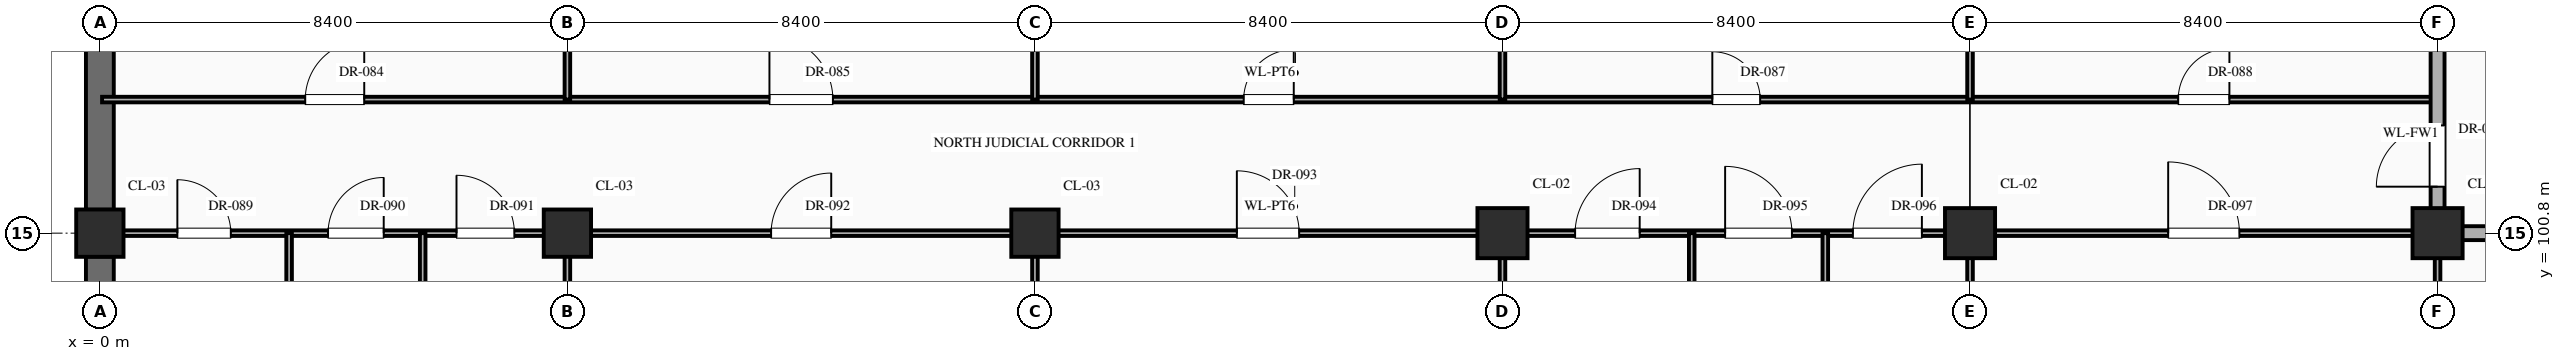
"""IFC4 building model, lengths in metres.
Left out: names, types, materials, properties, quantities, classifications, styles, units other than length and angle.
Written with IfcOpenShell. Run it as: python <this file> out.ifc"""

import sys

from ifc_helpers import new_model, si_unit, direction, frame, frame_2d, origin, origin_2d, place, context, subcontext, project, spatial, rectangle, extrude, element, fill, save


model = new_model("IFC4")
c1 = context("Model", 3, precision=1e-05, world=origin(), true_north=direction((0.0, 1.0)))
c2 = subcontext(c1, "Body", "Model", "MODEL_VIEW")
j1 = project(units=[si_unit("LENGTHUNIT", "METRE"), si_unit("PLANEANGLEUNIT", "RADIAN")], contexts=[c1])
p1 = place(None, origin())
s1 = spatial("IfcSite", under=j1, at=p1, CompositionType="ELEMENT")
p2 = place(p1, origin())
s2 = spatial("IfcBuilding", under=s1, at=p2, CompositionType="ELEMENT")
p3 = place(p2, frame((0.0, 0.0, -10.2)))
s3 = spatial("IfcBuildingStorey", under=s2, at=p3, CompositionType="ELEMENT", Elevation=-10.2)
for number, where, z_axis, x_axis in (
    (1, (0.0, 100.8, 0.0), (0.0, 0.0, 1.0), (1.0, 0.0, 0.0)),
    (2, (8.4, 100.8, 0.0), (0.0, 0.0, 1.0), (1.0, 0.0, 0.0)),
    (3, (16.8, 100.8, 0.0), (0.0, 0.0, 1.0), (1.0, 0.0, 0.0)),
):
    element("IfcColumn", number, at=place(p3, frame(where, z_axis=z_axis, x_axis=x_axis)), inside=s3, PredefinedType="COLUMN", context=c2, shape_type="SweptSolid", body=[
        extrude(rectangle(XDim=0.85, YDim=0.85, at=origin_2d()), origin(), (0.0, 0.0, 1.0), 4.8),
    ])
for number, where, z_axis, x_axis in (
    (4, (25.2, 100.8, 0.0), (0.0, 0.0, 1.0), (1.0, 0.0, 0.0)),
    (5, (33.6, 100.8, 0.0), (0.0, 0.0, 1.0), (1.0, 0.0, 0.0)),
    (6, (42.0, 100.8, 0.0), (0.0, 0.0, 1.0), (1.0, 0.0, 0.0)),
):
    element("IfcColumn", number, at=place(p3, frame(where, z_axis=z_axis, x_axis=x_axis)), inside=s3, PredefinedType="COLUMN", context=c2, shape_type="SweptSolid", body=[
        extrude(rectangle(XDim=0.9, YDim=0.9, at=origin_2d()), origin(), (0.0, 0.0, 1.0), 4.8),
    ])
p4 = place(p3, frame((0.0, 94.02, 0.0), z_axis=(0.0, 0.0, 1.0), x_axis=(0.0, 1.0, 0.0)))
e7 = element("IfcWall", 7, at=p4, inside=s3, PredefinedType="USERDEFINED", context=c2, shape_type="SweptSolid", body=[
    extrude(rectangle(XDim=6.36, YDim=0.5, at=frame_2d((3.18, 0.0))), origin(), (0.0, 0.0, 1.0), 4.48),
])
p5 = place(p3, frame((0.0, 101.22, 0.0), z_axis=(0.0, 0.0, 1.0), x_axis=(0.0, 1.0, 0.0)))
e8 = element("IfcWall", 8, at=p5, inside=s3, PredefinedType="USERDEFINED", context=c2, shape_type="SweptSolid", body=[
    extrude(rectangle(XDim=6.36, YDim=0.5, at=frame_2d((3.18, 0.0))), origin(), (0.0, 0.0, 1.0), 4.48),
])
p6 = place(p3, frame((0.04, 100.8, 0.0), z_axis=(0.0, 0.0, 1.0), x_axis=(1.0, 0.0, 0.0)))
e9 = element("IfcWall", 9, at=p6, inside=s3, PredefinedType="STANDARD", context=c2, shape_type="SweptSolid", body=[
    extrude(rectangle(XDim=41.96, YDim=0.1, at=frame_2d((20.98, 0.0))), origin(), (0.0, 0.0, 1.0), 3.63),
])
p7 = place(p6, frame((1.353, 0.0, 0.0)))
e10 = element("IfcOpeningElement", 10, at=p7, cuts=e9, PredefinedType="OPENING", context=c2, shape_type="SweptSolid", body=[
    extrude(rectangle(XDim=0.96, YDim=2.2, at=frame_2d((0.48, 1.1))), frame((0.0, 0.062, 0.0), z_axis=(0.0, -1.0, 0.0), x_axis=(1.0, 0.0, 0.0)), (0.0, 0.0, 1.0), 0.124),
])
p8 = place(p6, frame((4.06, 0.0, 0.0)))
e11 = element("IfcOpeningElement", 11, at=p8, cuts=e9, PredefinedType="OPENING", context=c2, shape_type="SweptSolid", body=[
    extrude(rectangle(XDim=1.0, YDim=2.25, at=frame_2d((0.5, 1.125))), frame((0.0, 0.062, 0.0), z_axis=(0.0, -1.0, 0.0), x_axis=(1.0, 0.0, 0.0)), (0.0, 0.0, 1.0), 0.124),
])
p9 = place(p6, frame((6.367, 0.0, 0.0)))
e12 = element("IfcOpeningElement", 12, at=p9, cuts=e9, PredefinedType="OPENING", context=c2, shape_type="SweptSolid", body=[
    extrude(rectangle(XDim=1.04, YDim=2.2, at=frame_2d((0.52, 1.1))), frame((0.0, 0.062, 0.0), z_axis=(0.0, -1.0, 0.0), x_axis=(1.0, 0.0, 0.0)), (0.0, 0.0, 1.0), 0.124),
])
p10 = place(p6, frame((12.02, 0.0, 0.0)))
e13 = element("IfcOpeningElement", 13, at=p10, cuts=e9, PredefinedType="OPENING", context=c2, shape_type="SweptSolid", body=[
    extrude(rectangle(XDim=1.08, YDim=2.25, at=frame_2d((0.54, 1.125))), frame((0.0, 0.062, 0.0), z_axis=(0.0, -1.0, 0.0), x_axis=(1.0, 0.0, 0.0)), (0.0, 0.0, 1.0), 0.124),
])
p11 = place(p6, frame((20.387, 0.0, 0.0)))
e14 = element("IfcOpeningElement", 14, at=p11, cuts=e9, PredefinedType="OPENING", context=c2, shape_type="SweptSolid", body=[
    extrude(rectangle(XDim=1.12, YDim=2.25, at=frame_2d((0.56, 1.125))), frame((0.0, 0.062, 0.0), z_axis=(0.0, -1.0, 0.0), x_axis=(1.0, 0.0, 0.0)), (0.0, 0.0, 1.0), 0.124),
])
p12 = place(p6, frame((26.465, 0.0, 0.0)))
e15 = element("IfcOpeningElement", 15, at=p12, cuts=e9, PredefinedType="OPENING", context=c2, shape_type="SweptSolid", body=[
    extrude(rectangle(XDim=1.16, YDim=2.3, at=frame_2d((0.58, 1.15))), frame((0.0, 0.062, 0.0), z_axis=(0.0, -1.0, 0.0), x_axis=(1.0, 0.0, 0.0)), (0.0, 0.0, 1.0), 0.124),
])
p13 = place(p6, frame((29.16, 0.0, 0.0)))
e16 = element("IfcOpeningElement", 16, at=p13, cuts=e9, PredefinedType="OPENING", context=c2, shape_type="SweptSolid", body=[
    extrude(rectangle(XDim=1.2, YDim=2.35, at=frame_2d((0.6, 1.175))), frame((0.0, 0.062, 0.0), z_axis=(0.0, -1.0, 0.0), x_axis=(1.0, 0.0, 0.0)), (0.0, 0.0, 1.0), 0.124),
])
p14 = place(p6, frame((31.455, 0.0, 0.0)))
e17 = element("IfcOpeningElement", 17, at=p14, cuts=e9, PredefinedType="OPENING", context=c2, shape_type="SweptSolid", body=[
    extrude(rectangle(XDim=1.24, YDim=2.3, at=frame_2d((0.62, 1.15))), frame((0.0, 0.062, 0.0), z_axis=(0.0, -1.0, 0.0), x_axis=(1.0, 0.0, 0.0)), (0.0, 0.0, 1.0), 0.124),
])
p15 = place(p6, frame((37.12, 0.0, 0.0)))
e18 = element("IfcOpeningElement", 18, at=p15, cuts=e9, PredefinedType="OPENING", context=c2, shape_type="SweptSolid", body=[
    extrude(rectangle(XDim=1.28, YDim=2.35, at=frame_2d((0.64, 1.175))), frame((0.0, 0.062, 0.0), z_axis=(0.0, -1.0, 0.0), x_axis=(1.0, 0.0, 0.0)), (0.0, 0.0, 1.0), 0.124),
])
p16 = place(p3, frame((42.0, 100.8, 0.0), z_axis=(0.0, 0.0, 1.0), x_axis=(1.0, 0.0, 0.0)))
e19 = element("IfcWall", 19, at=p16, inside=s3, PredefinedType="STANDARD", context=c2, shape_type="SweptSolid", body=[
    extrude(rectangle(XDim=4.2, YDim=0.25, at=frame_2d((2.1, 0.0))), origin(), (0.0, 0.0, 1.0), 3.63),
])
p17 = place(p3, frame((0.04, 103.2, 0.0), z_axis=(0.0, 0.0, 1.0), x_axis=(1.0, 0.0, 0.0)))
e20 = element("IfcWall", 20, at=p17, inside=s3, PredefinedType="STANDARD", context=c2, shape_type="SweptSolid", body=[
    extrude(rectangle(XDim=41.96, YDim=0.1, at=frame_2d((20.98, 0.0))), origin(), (0.0, 0.0, 1.0), 4.48),
])
p18 = place(p17, frame((3.65, 0.0, 0.0)))
e21 = element("IfcOpeningElement", 21, at=p18, cuts=e20, PredefinedType="OPENING", context=c2, shape_type="SweptSolid", body=[
    extrude(rectangle(XDim=1.06, YDim=2.4, at=frame_2d((0.53, 1.2))), frame((0.0, 0.062, 0.0), z_axis=(0.0, -1.0, 0.0), x_axis=(1.0, 0.0, 0.0)), (0.0, 0.0, 1.0), 0.124),
])
p19 = place(p17, frame((11.99, 0.0, 0.0)))
e22 = element("IfcOpeningElement", 22, at=p19, cuts=e20, PredefinedType="OPENING", context=c2, shape_type="SweptSolid", body=[
    extrude(rectangle(XDim=1.14, YDim=2.4, at=frame_2d((0.57, 1.2))), frame((0.0, 0.062, 0.0), z_axis=(0.0, -1.0, 0.0), x_axis=(1.0, 0.0, 0.0)), (0.0, 0.0, 1.0), 0.124),
])
p20 = place(p17, frame((20.51, 0.0, 0.0)))
e23 = element("IfcOpeningElement", 23, at=p20, cuts=e20, PredefinedType="OPENING", context=c2, shape_type="SweptSolid", body=[
    extrude(rectangle(XDim=0.9, YDim=2.15, at=frame_2d((0.45, 1.075))), frame((0.0, 0.062, 0.0), z_axis=(0.0, -1.0, 0.0), x_axis=(1.0, 0.0, 0.0)), (0.0, 0.0, 1.0), 0.124),
])
p21 = place(p17, frame((28.93, 0.0, 0.0)))
e24 = element("IfcOpeningElement", 24, at=p21, cuts=e20, PredefinedType="OPENING", context=c2, shape_type="SweptSolid", body=[
    extrude(rectangle(XDim=0.86, YDim=2.1, at=frame_2d((0.43, 1.05))), frame((0.0, 0.062, 0.0), z_axis=(0.0, -1.0, 0.0), x_axis=(1.0, 0.0, 0.0)), (0.0, 0.0, 1.0), 0.124),
])
p22 = place(p17, frame((37.3, 0.0, 0.0)))
e25 = element("IfcOpeningElement", 25, at=p22, cuts=e20, PredefinedType="OPENING", context=c2, shape_type="SweptSolid", body=[
    extrude(rectangle(XDim=0.92, YDim=2.15, at=frame_2d((0.46, 1.075))), frame((0.0, 0.062, 0.0), z_axis=(0.0, -1.0, 0.0), x_axis=(1.0, 0.0, 0.0)), (0.0, 0.0, 1.0), 0.124),
])
p23 = place(p3, frame((3.4, 96.0, 0.0), z_axis=(0.0, 0.0, 1.0), x_axis=(0.0, 1.0, 0.0)))
e26 = element("IfcWall", 26, at=p23, inside=s3, PredefinedType="STANDARD", context=c2, shape_type="SweptSolid", body=[
    extrude(rectangle(XDim=4.8, YDim=0.1, at=frame_2d((2.4, 0.0))), origin(), (0.0, 0.0, 1.0), 4.48),
])
p24 = place(p23, frame((1.9, 0.0, 0.0)))
e27 = element("IfcOpeningElement", 27, at=p24, cuts=e26, PredefinedType="OPENING", context=c2, shape_type="SweptSolid", body=[
    extrude(rectangle(XDim=1.0, YDim=2.25, at=frame_2d((0.5, 1.125))), frame((0.0, 0.062, 0.0), z_axis=(0.0, -1.0, 0.0), x_axis=(1.0, 0.0, 0.0)), (0.0, 0.0, 1.0), 0.124),
])
p25 = place(p3, frame((5.8, 96.0, 0.0), z_axis=(0.0, 0.0, 1.0), x_axis=(0.0, 1.0, 0.0)))
e28 = element("IfcWall", 28, at=p25, inside=s3, PredefinedType="STANDARD", context=c2, shape_type="SweptSolid", body=[
    extrude(rectangle(XDim=4.8, YDim=0.1, at=frame_2d((2.4, 0.0))), origin(), (0.0, 0.0, 1.0), 4.48),
])
p26 = place(p25, frame((1.88, 0.0, 0.0)))
e29 = element("IfcOpeningElement", 29, at=p26, cuts=e28, PredefinedType="OPENING", context=c2, shape_type="SweptSolid", body=[
    extrude(rectangle(XDim=1.04, YDim=2.2, at=frame_2d((0.52, 1.1))), frame((0.0, 0.062, 0.0), z_axis=(0.0, -1.0, 0.0), x_axis=(1.0, 0.0, 0.0)), (0.0, 0.0, 1.0), 0.124),
])
for number, where, z_axis, x_axis in (
    (30, (8.4, 96.0, 0.0), (0.0, 0.0, 1.0), (0.0, 1.0, 0.0)),
    (31, (8.4, 103.2, 0.0), (0.0, 0.0, 1.0), (0.0, 1.0, 0.0)),
    (32, (16.8, 96.0, 0.0), (0.0, 0.0, 1.0), (0.0, 1.0, 0.0)),
    (33, (16.8, 103.2, 0.0), (0.0, 0.0, 1.0), (0.0, 1.0, 0.0)),
    (34, (25.2, 96.0, 0.0), (0.0, 0.0, 1.0), (0.0, 1.0, 0.0)),
    (35, (25.2, 103.2, 0.0), (0.0, 0.0, 1.0), (0.0, 1.0, 0.0)),
):
    element("IfcWall", number, at=place(p3, frame(where, z_axis=z_axis, x_axis=x_axis)), inside=s3, PredefinedType="STANDARD", context=c2, shape_type="SweptSolid", body=[
        extrude(rectangle(XDim=4.8, YDim=0.1, at=frame_2d((2.4, 0.0))), origin(), (0.0, 0.0, 1.0), 3.73),
    ])
p27 = place(p3, frame((28.6, 96.0, 0.0), z_axis=(0.0, 0.0, 1.0), x_axis=(0.0, 1.0, 0.0)))
e36 = element("IfcWall", 36, at=p27, inside=s3, PredefinedType="STANDARD", context=c2, shape_type="SweptSolid", body=[
    extrude(rectangle(XDim=4.8, YDim=0.1, at=frame_2d((2.4, 0.0))), origin(), (0.0, 0.0, 1.0), 4.48),
])
p28 = place(p27, frame((1.86, 0.0, 0.0)))
e37 = element("IfcOpeningElement", 37, at=p28, cuts=e36, PredefinedType="OPENING", context=c2, shape_type="SweptSolid", body=[
    extrude(rectangle(XDim=1.08, YDim=2.25, at=frame_2d((0.54, 1.125))), frame((0.0, 0.062, 0.0), z_axis=(0.0, -1.0, 0.0), x_axis=(1.0, 0.0, 0.0)), (0.0, 0.0, 1.0), 0.124),
])
p29 = place(p3, frame((31.0, 96.0, 0.0), z_axis=(0.0, 0.0, 1.0), x_axis=(0.0, 1.0, 0.0)))
e38 = element("IfcWall", 38, at=p29, inside=s3, PredefinedType="STANDARD", context=c2, shape_type="SweptSolid", body=[
    extrude(rectangle(XDim=4.8, YDim=0.1, at=frame_2d((2.4, 0.0))), origin(), (0.0, 0.0, 1.0), 4.48),
])
p30 = place(p29, frame((1.84, 0.0, 0.0)))
e39 = element("IfcOpeningElement", 39, at=p30, cuts=e38, PredefinedType="OPENING", context=c2, shape_type="SweptSolid", body=[
    extrude(rectangle(XDim=1.12, YDim=2.25, at=frame_2d((0.56, 1.125))), frame((0.0, 0.062, 0.0), z_axis=(0.0, -1.0, 0.0), x_axis=(1.0, 0.0, 0.0)), (0.0, 0.0, 1.0), 0.124),
])
for number, where, z_axis, x_axis in (
    (40, (33.6, 96.0, 0.0), (0.0, 0.0, 1.0), (0.0, 1.0, 0.0)),
    (41, (33.6, 103.2, 0.0), (0.0, 0.0, 1.0), (0.0, 1.0, 0.0)),
    (42, (42.0, 96.0, 0.0), (0.0, 0.0, 1.0), (0.0, 1.0, 0.0)),
):
    element("IfcWall", number, at=place(p3, frame(where, z_axis=z_axis, x_axis=x_axis)), inside=s3, PredefinedType="STANDARD", context=c2, shape_type="SweptSolid", body=[
        extrude(rectangle(XDim=4.8, YDim=0.1, at=frame_2d((2.4, 0.0))), origin(), (0.0, 0.0, 1.0), 3.73),
    ])
p31 = place(p3, frame((42.0, 100.8, 0.0), z_axis=(0.0, 0.0, 1.0), x_axis=(0.0, 1.0, 0.0)))
e43 = element("IfcWall", 43, at=p31, inside=s3, PredefinedType="STANDARD", context=c2, shape_type="SweptSolid", body=[
    extrude(rectangle(XDim=3.6, YDim=0.25, at=frame_2d((1.8, 0.0))), origin(), (0.0, 0.0, 1.0), 3.73),
])
p32 = place(p31, frame((0.835, 0.0, 0.0)))
e44 = element("IfcOpeningElement", 44, at=p32, cuts=e43, PredefinedType="OPENING", context=c2, shape_type="SweptSolid", body=[
    extrude(rectangle(XDim=1.1, YDim=2.2, at=frame_2d((0.55, 1.1))), frame((0.0, 0.137, 0.0), z_axis=(0.0, -1.0, 0.0), x_axis=(1.0, 0.0, 0.0)), (0.0, 0.0, 1.0), 0.274),
])
p33 = place(p32, origin())
e45 = element("IfcDoor", 45, at=p33, inside=s3, OperationType="SINGLE_SWING_LEFT", PredefinedType="DOOR", context=c2, shape_type="SweptSolid", body=[
    extrude(rectangle(XDim=1.1, YDim=2.2, at=frame_2d((0.55, 1.1))), frame((0.0, 0.025, 0.0), z_axis=(0.0, -1.0, 0.0), x_axis=(1.0, 0.0, 0.0)), (0.0, 0.0, 1.0), 0.05),
])
fill(e44, e45)
p34 = place(p18, origin())
e46 = element("IfcDoor", 46, at=p34, inside=s3, OperationType="SINGLE_SWING_RIGHT", PredefinedType="DOOR", context=c2, shape_type="SweptSolid", body=[
    extrude(rectangle(XDim=1.06, YDim=2.4, at=frame_2d((0.53, 1.2))), frame((0.0, 0.025, 0.0), z_axis=(0.0, -1.0, 0.0), x_axis=(1.0, 0.0, 0.0)), (0.0, 0.0, 1.0), 0.05),
])
fill(e21, e46)
p35 = place(p19, origin())
e47 = element("IfcDoor", 47, at=p35, inside=s3, OperationType="SINGLE_SWING_LEFT", PredefinedType="DOOR", context=c2, shape_type="SweptSolid", body=[
    extrude(rectangle(XDim=1.14, YDim=2.4, at=frame_2d((0.57, 1.2))), frame((0.0, 0.025, 0.0), z_axis=(0.0, -1.0, 0.0), x_axis=(1.0, 0.0, 0.0)), (0.0, 0.0, 1.0), 0.05),
])
fill(e22, e47)
p36 = place(p20, origin())
e48 = element("IfcDoor", 48, at=p36, inside=s3, OperationType="SINGLE_SWING_RIGHT", PredefinedType="DOOR", context=c2, shape_type="SweptSolid", body=[
    extrude(rectangle(XDim=0.9, YDim=2.15, at=frame_2d((0.45, 1.075))), frame((0.0, 0.025, 0.0), z_axis=(0.0, -1.0, 0.0), x_axis=(1.0, 0.0, 0.0)), (0.0, 0.0, 1.0), 0.05),
])
fill(e23, e48)
p37 = place(p21, origin())
e49 = element("IfcDoor", 49, at=p37, inside=s3, OperationType="SINGLE_SWING_LEFT", PredefinedType="DOOR", context=c2, shape_type="SweptSolid", body=[
    extrude(rectangle(XDim=0.86, YDim=2.1, at=frame_2d((0.43, 1.05))), frame((0.0, 0.025, 0.0), z_axis=(0.0, -1.0, 0.0), x_axis=(1.0, 0.0, 0.0)), (0.0, 0.0, 1.0), 0.05),
])
fill(e24, e49)
p38 = place(p22, origin())
e50 = element("IfcDoor", 50, at=p38, inside=s3, OperationType="SINGLE_SWING_RIGHT", PredefinedType="DOOR", context=c2, shape_type="SweptSolid", body=[
    extrude(rectangle(XDim=0.92, YDim=2.15, at=frame_2d((0.46, 1.075))), frame((0.0, 0.025, 0.0), z_axis=(0.0, -1.0, 0.0), x_axis=(1.0, 0.0, 0.0)), (0.0, 0.0, 1.0), 0.05),
])
fill(e25, e50)
p39 = place(p7, origin())
e51 = element("IfcDoor", 51, at=p39, inside=s3, OperationType="SINGLE_SWING_LEFT", PredefinedType="DOOR", context=c2, shape_type="SweptSolid", body=[
    extrude(rectangle(XDim=0.96, YDim=2.2, at=frame_2d((0.48, 1.1))), frame((0.0, 0.025, 0.0), z_axis=(0.0, -1.0, 0.0), x_axis=(1.0, 0.0, 0.0)), (0.0, 0.0, 1.0), 0.05),
])
fill(e10, e51)
p40 = place(p8, origin())
e52 = element("IfcDoor", 52, at=p40, inside=s3, OperationType="SINGLE_SWING_RIGHT", PredefinedType="DOOR", context=c2, shape_type="SweptSolid", body=[
    extrude(rectangle(XDim=1.0, YDim=2.25, at=frame_2d((0.5, 1.125))), frame((0.0, 0.025, 0.0), z_axis=(0.0, -1.0, 0.0), x_axis=(1.0, 0.0, 0.0)), (0.0, 0.0, 1.0), 0.05),
])
fill(e11, e52)
p41 = place(p9, origin())
e53 = element("IfcDoor", 53, at=p41, inside=s3, OperationType="SINGLE_SWING_LEFT", PredefinedType="DOOR", context=c2, shape_type="SweptSolid", body=[
    extrude(rectangle(XDim=1.04, YDim=2.2, at=frame_2d((0.52, 1.1))), frame((0.0, 0.025, 0.0), z_axis=(0.0, -1.0, 0.0), x_axis=(1.0, 0.0, 0.0)), (0.0, 0.0, 1.0), 0.05),
])
fill(e12, e53)
p42 = place(p10, origin())
e54 = element("IfcDoor", 54, at=p42, inside=s3, OperationType="SINGLE_SWING_RIGHT", PredefinedType="DOOR", context=c2, shape_type="SweptSolid", body=[
    extrude(rectangle(XDim=1.08, YDim=2.25, at=frame_2d((0.54, 1.125))), frame((0.0, 0.025, 0.0), z_axis=(0.0, -1.0, 0.0), x_axis=(1.0, 0.0, 0.0)), (0.0, 0.0, 1.0), 0.05),
])
fill(e13, e54)
p43 = place(p11, origin())
e55 = element("IfcDoor", 55, at=p43, inside=s3, OperationType="SINGLE_SWING_LEFT", PredefinedType="DOOR", context=c2, shape_type="SweptSolid", body=[
    extrude(rectangle(XDim=1.12, YDim=2.25, at=frame_2d((0.56, 1.125))), frame((0.0, 0.025, 0.0), z_axis=(0.0, -1.0, 0.0), x_axis=(1.0, 0.0, 0.0)), (0.0, 0.0, 1.0), 0.05),
])
fill(e14, e55)
p44 = place(p12, origin())
e56 = element("IfcDoor", 56, at=p44, inside=s3, OperationType="SINGLE_SWING_RIGHT", PredefinedType="DOOR", context=c2, shape_type="SweptSolid", body=[
    extrude(rectangle(XDim=1.16, YDim=2.3, at=frame_2d((0.58, 1.15))), frame((0.0, 0.025, 0.0), z_axis=(0.0, -1.0, 0.0), x_axis=(1.0, 0.0, 0.0)), (0.0, 0.0, 1.0), 0.05),
])
fill(e15, e56)
p45 = place(p13, origin())
e57 = element("IfcDoor", 57, at=p45, inside=s3, OperationType="SINGLE_SWING_LEFT", PredefinedType="DOOR", context=c2, shape_type="SweptSolid", body=[
    extrude(rectangle(XDim=1.2, YDim=2.35, at=frame_2d((0.6, 1.175))), frame((0.0, 0.025, 0.0), z_axis=(0.0, -1.0, 0.0), x_axis=(1.0, 0.0, 0.0)), (0.0, 0.0, 1.0), 0.05),
])
fill(e16, e57)
p46 = place(p14, origin())
e58 = element("IfcDoor", 58, at=p46, inside=s3, OperationType="SINGLE_SWING_RIGHT", PredefinedType="DOOR", context=c2, shape_type="SweptSolid", body=[
    extrude(rectangle(XDim=1.24, YDim=2.3, at=frame_2d((0.62, 1.15))), frame((0.0, 0.025, 0.0), z_axis=(0.0, -1.0, 0.0), x_axis=(1.0, 0.0, 0.0)), (0.0, 0.0, 1.0), 0.05),
])
fill(e17, e58)
p47 = place(p15, origin())
e59 = element("IfcDoor", 59, at=p47, inside=s3, OperationType="SINGLE_SWING_LEFT", PredefinedType="DOOR", context=c2, shape_type="SweptSolid", body=[
    extrude(rectangle(XDim=1.28, YDim=2.35, at=frame_2d((0.64, 1.175))), frame((0.0, 0.025, 0.0), z_axis=(0.0, -1.0, 0.0), x_axis=(1.0, 0.0, 0.0)), (0.0, 0.0, 1.0), 0.05),
])
fill(e18, e59)
save(model, sys.argv[1])
